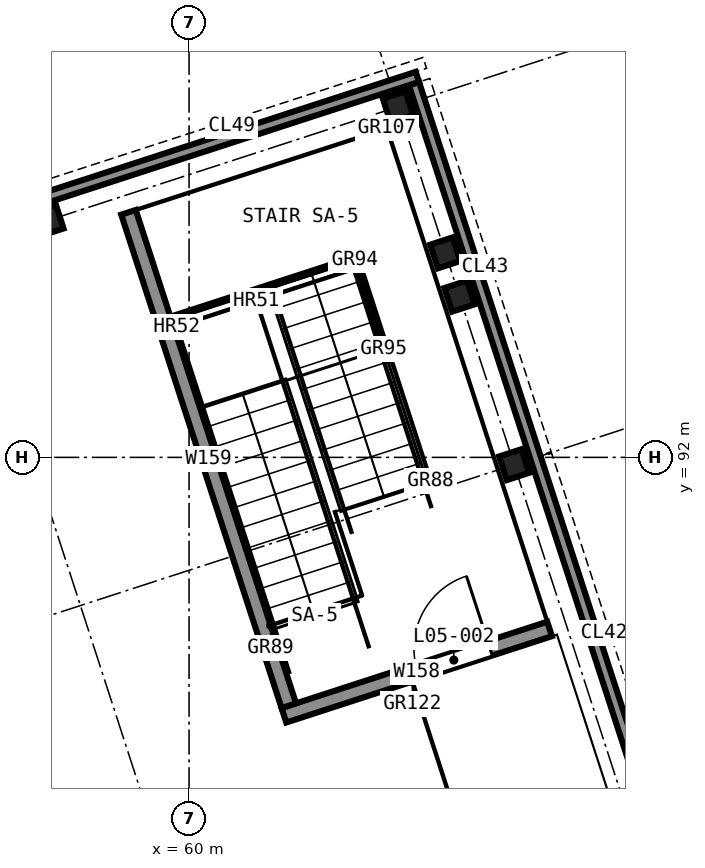
"""IFC4 building model, lengths in metres.
Left out: names, types, materials, properties, quantities, classifications, styles, units other than length and angle.
Written with IfcOpenShell. Run it as: python <this file> out.ifc"""

import sys

from ifc_helpers import new_model, si_unit, direction, frame, frame_2d, origin, origin_2d, place, context, subcontext, project, spatial, rectangle, i_section, extrude, element, fill, save


model = new_model("IFC4")
c1 = context("Model", 3, precision=1e-05, world=origin(), true_north=direction((0.0, 1.0)))
c2 = subcontext(c1, "Body", "Model", "MODEL_VIEW")
j1 = project(units=[si_unit("LENGTHUNIT", "METRE"), si_unit("PLANEANGLEUNIT", "RADIAN")], contexts=[c1])
p1 = place(None, origin())
s1 = spatial("IfcSite", under=j1, at=p1, CompositionType="ELEMENT")
p2 = place(p1, origin())
s2 = spatial("IfcBuilding", under=s1, at=p2, CompositionType="ELEMENT")
p3 = place(p2, frame((0.0, 0.0, 21.5)))
s3 = spatial("IfcBuildingStorey", under=s2, at=p3, CompositionType="ELEMENT", Elevation=21.5)
for number, where, z_axis, x_axis in (
    (1, (63.557, 94.12, 0.0), (0.0, 0.0, 1.0), (0.951, 0.309, 0.0)),
    (2, (63.372, 94.691, 0.0), (0.0, 0.0, 1.0), (0.951, 0.309, 0.0)),
):
    element("IfcColumn", number, at=place(p3, frame(where, z_axis=z_axis, x_axis=x_axis)), inside=s3, PredefinedType="COLUMN", context=c2, shape_type="SweptSolid", body=[
        extrude(i_section(OverallWidth=0.311, OverallDepth=0.327, WebThickness=0.016, FlangeThickness=0.025, FilletRadius=0.017, at=origin_2d()), origin(), (0.0, 0.0, 1.0), 3.85),
    ])
p4 = place(p3, frame((64.743, 89.743, 0.0), z_axis=(0.0, 0.0, 1.0), x_axis=(-0.95104773735, -0.309044011885, 0.0)))
e3 = element("IfcWall", 3, at=p4, inside=s3, PredefinedType="SOLIDWALL", context=c2, shape_type="SweptSolid", body=[
    extrude(rectangle(XDim=3.675, YDim=0.2, at=frame_2d((1.837, 0.0))), origin(), (0.0, 0.0, 1.0), 4.0),
])
p5 = place(p4, frame((0.825, 0.0, 0.0)))
e4 = element("IfcOpeningElement", 4, at=p5, cuts=e3, PredefinedType="OPENING", context=c2, shape_type="SweptSolid", body=[
    extrude(rectangle(XDim=1.0, YDim=2.1, at=frame_2d((0.5, 1.05))), frame((0.0, 0.11, 0.0), z_axis=(0.0, -1.0, 0.0), x_axis=(1.0, 0.0, 0.0)), (0.0, 0.0, 1.0), 0.22),
])
p6 = place(p3, frame((61.312, 88.733, 0.0), z_axis=(0.0, 0.0, 1.0), x_axis=(-0.309028643499, 0.951052731186, 0.0)))
e5 = element("IfcWall", 5, at=p6, inside=s3, PredefinedType="SOLIDWALL", context=c2, shape_type="SweptSolid", body=[
    extrude(rectangle(XDim=6.825, YDim=0.2, at=frame_2d((3.413, 0.0))), origin(), (0.0, 0.0, 1.0), 4.0),
])
p7 = place(p3, frame((64.277, 91.905, 0.0), z_axis=(0.0, 0.0, 1.0), x_axis=(0.951056516295, 0.309016994375, 0.0)))
e6 = element("IfcColumn", 6, at=p7, inside=s3, PredefinedType="COLUMN", context=c2, shape_type="SweptSolid", body=[
    extrude(i_section(OverallWidth=0.311, OverallDepth=0.327, WebThickness=0.016, FlangeThickness=0.025, FilletRadius=0.017, at=origin_2d()), origin(), (0.0, 0.0, 1.0), 4.0),
])
p8 = place(p3, frame((58.151, 95.119, 0.0), z_axis=(0.0, 0.0, 1.0), x_axis=(0.951056516295, 0.309016994375, 0.0)))
e7 = element("IfcColumn", 7, at=p8, inside=s3, PredefinedType="COLUMN", context=c2, shape_type="SweptSolid", body=[
    extrude(i_section(OverallWidth=0.311, OverallDepth=0.327, WebThickness=0.016, FlangeThickness=0.025, FilletRadius=0.017, at=origin_2d()), origin(), (0.0, 0.0, 1.0), 3.85),
])
p9 = place(p3, frame((62.748, 96.612, 0.0), z_axis=(0.0, 0.0, 1.0), x_axis=(0.951056516295, 0.309016994375, 0.0)))
e8 = element("IfcColumn", 8, at=p9, inside=s3, PredefinedType="COLUMN", context=c2, shape_type="SweptSolid", body=[
    extrude(i_section(OverallWidth=0.311, OverallDepth=0.327, WebThickness=0.016, FlangeThickness=0.025, FilletRadius=0.017, at=origin_2d()), origin(), (0.0, 0.0, 1.0), 4.0),
])
p10 = place(p3, frame((69.271, 77.492, 0.0), z_axis=(0.0, 0.0, 1.0), x_axis=(-0.309021745532, 0.951054972537, 0.0)))
e9 = element("IfcWall", 9, at=p10, inside=s3, PredefinedType="SOLIDWALL", context=c2, shape_type="SweptSolid", body=[
    extrude(rectangle(XDim=20.425, YDim=0.14, at=frame_2d((10.212, 0.0))), origin(), (0.0, 0.0, 1.0), 4.0),
])
p11 = place(p3, frame((34.729, 87.819, 0.0), z_axis=(0.0, 0.0, 1.0), x_axis=(0.951057118925, 0.309015139665, 0.0)))
e10 = element("IfcWall", 10, at=p11, inside=s3, PredefinedType="SOLIDWALL", context=c2, shape_type="SweptSolid", body=[
    extrude(rectangle(XDim=29.73, YDim=0.14, at=frame_2d((14.865, 0.0))), origin(), (0.0, 0.0, 1.0), 4.0),
])
p12 = place(p5, frame((1.0, 0.0, 0.0), z_axis=(0.0, 0.0, 1.0), x_axis=(-1.0, 0.0, 0.0)))
e11 = element("IfcDoor", 11, at=p12, inside=s3, OperationType="SINGLE_SWING_LEFT", PredefinedType="DOOR", context=c2, shape_type="SweptSolid", body=[
    extrude(rectangle(XDim=1.0, YDim=2.1, at=frame_2d((0.5, 1.05))), frame((0.0, 0.025, 0.0), z_axis=(0.0, -1.0, 0.0), x_axis=(1.0, 0.0, 0.0)), (0.0, 0.0, 1.0), 0.05),
])
fill(e4, e11)
save(model, sys.argv[1])
